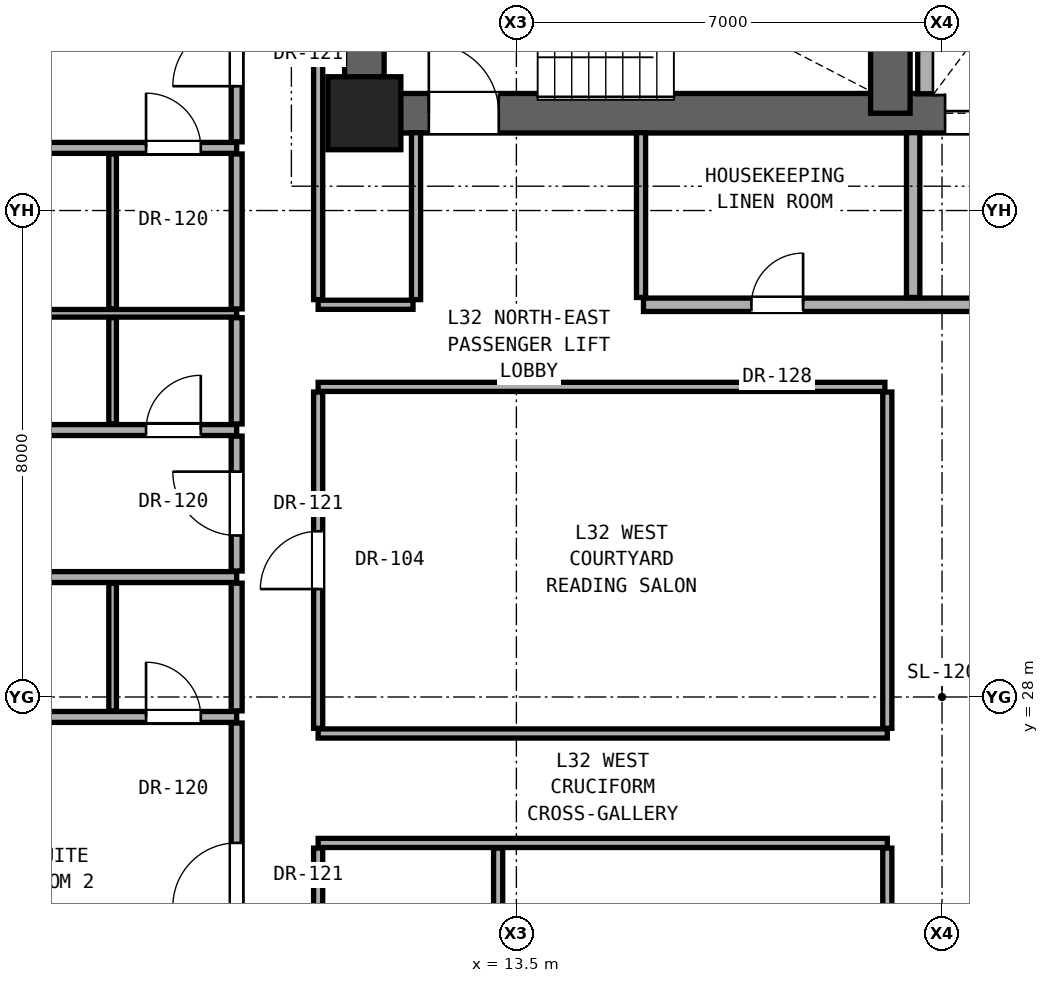
"""IFC4 building model, lengths in metres.
Left out: names, types, materials, properties, quantities, classifications, styles, units other than length and angle.
Written with IfcOpenShell. Run it as: python <this file> out.ifc"""

import sys

from ifc_helpers import new_model, si_unit, direction, frame, frame_2d, origin, origin_2d, place, context, subcontext, project, spatial, rectangle, extrude, element, fill, save


model = new_model("IFC4")
c1 = context("Model", 3, precision=1e-05, world=origin(), true_north=direction((0.0, 1.0)))
c2 = subcontext(c1, "Body", "Model", "MODEL_VIEW")
j1 = project(units=[si_unit("LENGTHUNIT", "METRE"), si_unit("PLANEANGLEUNIT", "RADIAN")], contexts=[c1])
p1 = place(None, origin())
s1 = spatial("IfcSite", under=j1, at=p1, CompositionType="ELEMENT")
p2 = place(p1, origin())
s2 = spatial("IfcBuilding", under=s1, at=p2, CompositionType="ELEMENT")
p3 = place(p2, frame((0.0, 0.0, 114.8)))
s3 = spatial("IfcBuildingStorey", under=s2, at=p3, CompositionType="ELEMENT", Elevation=114.8)
p4 = place(p3, frame((11.0, 37.6, 0.0), z_axis=(0.0, 0.0, 1.0), x_axis=(1.0, 0.0, 0.0)))
e1 = element("IfcColumn", 1, at=p4, inside=s3, PredefinedType="COLUMN", context=c2, shape_type="SweptSolid", body=[
    extrude(rectangle(XDim=1.2, YDim=1.2, at=origin_2d()), origin(), (0.0, 0.0, 1.0), 3.3),
])
p5 = place(p3, frame((11.0, 37.6, 0.0), z_axis=(0.0, 0.0, 1.0), x_axis=(0.0, 1.0, 0.0)))
e2 = element("IfcWall", 2, at=p5, inside=s3, PredefinedType="SHEAR", context=c2, shape_type="SweptSolid", body=[
    extrude(rectangle(XDim=6.0, YDim=0.65, at=frame_2d((3.0, 0.0))), origin(), (0.0, 0.0, 1.0), 3.08),
])
p6 = place(p3, frame((11.0, 37.6, 0.0), z_axis=(0.0, 0.0, 1.0), x_axis=(1.0, 0.0, 0.0)))
e3 = element("IfcWall", 3, at=p6, inside=s3, PredefinedType="SHEAR", context=c2, shape_type="SweptSolid", body=[
    extrude(rectangle(XDim=19.0, YDim=0.65, at=frame_2d((9.5, 0.0))), origin(), (0.0, 0.0, 1.0), 3.08),
])
p7 = place(p6, frame((1.06, 0.0, 0.0)))
e4 = element("IfcOpeningElement", 4, at=p7, cuts=e3, PredefinedType="OPENING", context=c2, shape_type="SweptSolid", body=[
    extrude(rectangle(XDim=1.15, YDim=2.2, at=frame_2d((0.575, 1.1))), frame((0.0, 0.335, 0.0), z_axis=(0.0, -1.0, 0.0), x_axis=(1.0, 0.0, 0.0)), (0.0, 0.0, 1.0), 0.67),
])
p8 = place(p6, frame((9.55, 0.0, 0.0)))
e5 = element("IfcOpeningElement", 5, at=p8, cuts=e3, PredefinedType="OPENING", context=c2, shape_type="SweptSolid", body=[
    extrude(rectangle(XDim=1.4, YDim=2.35, at=frame_2d((0.7, 1.175))), frame((0.0, 0.335, 0.0), z_axis=(0.0, -1.0, 0.0), x_axis=(1.0, 0.0, 0.0)), (0.0, 0.0, 1.0), 0.67),
])
p9 = place(p6, frame((11.95, 0.0, 0.0)))
e6 = element("IfcOpeningElement", 6, at=p9, cuts=e3, PredefinedType="OPENING", context=c2, shape_type="SweptSolid", body=[
    extrude(rectangle(XDim=1.4, YDim=2.35, at=frame_2d((0.7, 1.175))), frame((0.0, 0.335, 0.0), z_axis=(0.0, -1.0, 0.0), x_axis=(1.0, 0.0, 0.0)), (0.0, 0.0, 1.0), 0.67),
])
p10 = place(p3, frame((19.65, 37.6, 0.0), z_axis=(0.0, 0.0, 1.0), x_axis=(0.0, 1.0, 0.0)))
e7 = element("IfcWall", 7, at=p10, inside=s3, PredefinedType="SHEAR", context=c2, shape_type="SweptSolid", body=[
    extrude(rectangle(XDim=3.493, YDim=0.65, at=frame_2d((1.747, 0.0))), origin(), (0.0, 0.0, 1.0), 3.08),
])
for number, where, z_axis, x_axis in (
    (8, (10.24, 25.6, 0.0), (0.0, 0.0, 1.0), (1.0, 0.0, 0.0)),
    (9, (10.24, 27.4, 0.0), (0.0, 0.0, 1.0), (1.0, 0.0, 0.0)),
):
    element("IfcWall", number, at=place(p3, frame(where, z_axis=z_axis, x_axis=x_axis)), inside=s3, PredefinedType="PARTITIONING", context=c2, shape_type="SweptSolid", body=[
        extrude(rectangle(XDim=9.36, YDim=0.15, at=frame_2d((4.68, 0.0))), origin(), (0.0, 0.0, 1.0), 2.124),
    ])
p11 = place(p3, frame((-1.97, 27.672, 0.0), z_axis=(0.0, 0.0, 1.0), x_axis=(1.0, 0.0, 0.0)))
e10 = element("IfcWall", 10, at=p11, inside=s3, PredefinedType="PARTITIONING", context=c2, shape_type="SweptSolid", body=[
    extrude(rectangle(XDim=10.87, YDim=0.18, at=frame_2d((5.435, 0.0))), origin(), (0.0, 0.0, 1.0), 2.145),
])
p12 = place(p11, frame((4.01, 0.0, 0.0)))
e11 = element("IfcOpeningElement", 11, at=p12, cuts=e10, PredefinedType="OPENING", context=c2, shape_type="SweptSolid", body=[
    extrude(rectangle(XDim=0.85, YDim=2.01, at=frame_2d((0.425, 1.005))), frame((0.0, 0.1, 0.0), z_axis=(0.0, -1.0, 0.0), x_axis=(1.0, 0.0, 0.0)), (0.0, 0.0, 1.0), 0.2),
])
p13 = place(p11, frame((9.38, 0.0, 0.0)))
e12 = element("IfcOpeningElement", 12, at=p13, cuts=e10, PredefinedType="OPENING", context=c2, shape_type="SweptSolid", body=[
    extrude(rectangle(XDim=0.9, YDim=2.1, at=frame_2d((0.45, 1.05))), frame((0.0, 0.1, 0.0), z_axis=(0.0, -1.0, 0.0), x_axis=(1.0, 0.0, 0.0)), (0.0, 0.0, 1.0), 0.2),
])
p14 = place(p3, frame((-1.97, 29.972, 0.0), z_axis=(0.0, 0.0, 1.0), x_axis=(1.0, 0.0, 0.0)))
e13 = element("IfcWall", 13, at=p14, inside=s3, PredefinedType="PARTITIONING", context=c2, shape_type="SweptSolid", body=[
    extrude(rectangle(XDim=10.87, YDim=0.18, at=frame_2d((5.435, 0.0))), origin(), (0.0, 0.0, 1.0), 2.145),
])
p15 = place(p3, frame((-1.97, 32.39, 0.0), z_axis=(0.0, 0.0, 1.0), x_axis=(1.0, 0.0, 0.0)))
e14 = element("IfcWall", 14, at=p15, inside=s3, PredefinedType="PARTITIONING", context=c2, shape_type="SweptSolid", body=[
    extrude(rectangle(XDim=10.87, YDim=0.18, at=frame_2d((5.435, 0.0))), origin(), (0.0, 0.0, 1.0), 2.145),
])
p16 = place(p15, frame((4.96, 0.0, 0.0)))
e15 = element("IfcOpeningElement", 15, at=p16, cuts=e14, PredefinedType="OPENING", context=c2, shape_type="SweptSolid", body=[
    extrude(rectangle(XDim=0.85, YDim=2.01, at=frame_2d((0.425, 1.005))), frame((0.0, 0.1, 0.0), z_axis=(0.0, -1.0, 0.0), x_axis=(1.0, 0.0, 0.0)), (0.0, 0.0, 1.0), 0.2),
])
p17 = place(p15, frame((9.38, 0.0, 0.0)))
e16 = element("IfcOpeningElement", 16, at=p17, cuts=e14, PredefinedType="OPENING", context=c2, shape_type="SweptSolid", body=[
    extrude(rectangle(XDim=0.9, YDim=2.1, at=frame_2d((0.45, 1.05))), frame((0.0, 0.1, 0.0), z_axis=(0.0, -1.0, 0.0), x_axis=(1.0, 0.0, 0.0)), (0.0, 0.0, 1.0), 0.2),
])
p18 = place(p3, frame((10.24, 33.1, 0.0), z_axis=(0.0, 0.0, 1.0), x_axis=(1.0, 0.0, 0.0)))
e17 = element("IfcWall", 17, at=p18, inside=s3, PredefinedType="PARTITIONING", context=c2, shape_type="SweptSolid", body=[
    extrude(rectangle(XDim=9.32, YDim=0.15, at=frame_2d((4.66, 0.0))), origin(), (0.0, 0.0, 1.0), 2.124),
])
p19 = place(p3, frame((-1.97, 34.31, 0.0), z_axis=(0.0, 0.0, 1.0), x_axis=(1.0, 0.0, 0.0)))
e18 = element("IfcWall", 18, at=p19, inside=s3, PredefinedType="PARTITIONING", context=c2, shape_type="SweptSolid", body=[
    extrude(rectangle(XDim=10.87, YDim=0.125, at=frame_2d((5.435, 0.0))), origin(), (0.0, 0.0, 1.0), 2.145),
])
p20 = place(p3, frame((10.24, 34.45, 0.0), z_axis=(0.0, 0.0, 1.0), x_axis=(1.0, 0.0, 0.0)))
e19 = element("IfcWall", 19, at=p20, inside=s3, PredefinedType="PARTITIONING", context=c2, shape_type="SweptSolid", body=[
    extrude(rectangle(XDim=1.56, YDim=0.15, at=frame_2d((0.78, 0.0))), origin(), (0.0, 0.0, 1.0), 2.124),
])
p21 = place(p3, frame((15.59, 34.45, 0.0), z_axis=(0.0, 0.0, 1.0), x_axis=(1.0, 0.0, 0.0)))
e20 = element("IfcWall", 20, at=p21, inside=s3, PredefinedType="SOLIDWALL", context=c2, shape_type="SweptSolid", body=[
    extrude(rectangle(XDim=15.17, YDim=0.22, at=frame_2d((7.585, 0.0))), origin(), (0.0, 0.0, 1.0), 2.124),
])
p22 = place(p21, frame((6.435, 0.0, 0.0)))
e21 = element("IfcOpeningElement", 21, at=p22, cuts=e20, PredefinedType="OPENING", context=c2, shape_type="SweptSolid", body=[
    extrude(rectangle(XDim=0.85, YDim=2.01, at=frame_2d((0.425, 1.005))), frame((0.0, 0.12, 0.0), z_axis=(0.0, -1.0, 0.0), x_axis=(1.0, 0.0, 0.0)), (0.0, 0.0, 1.0), 0.24),
])
p23 = place(p21, frame((11.135, 0.0, 0.0)))
e22 = element("IfcOpeningElement", 22, at=p23, cuts=e20, PredefinedType="OPENING", context=c2, shape_type="SweptSolid", body=[
    extrude(rectangle(XDim=0.85, YDim=2.01, at=frame_2d((0.425, 1.005))), frame((0.0, 0.12, 0.0), z_axis=(0.0, -1.0, 0.0), x_axis=(1.0, 0.0, 0.0)), (0.0, 0.0, 1.0), 0.24),
])
p24 = place(p21, frame((1.775, 0.0, 0.0)))
e23 = element("IfcOpeningElement", 23, at=p24, cuts=e20, PredefinedType="OPENING", context=c2, shape_type="SweptSolid", body=[
    extrude(rectangle(XDim=0.85, YDim=2.01, at=frame_2d((0.425, 1.005))), frame((0.0, 0.12, 0.0), z_axis=(0.0, -1.0, 0.0), x_axis=(1.0, 0.0, 0.0)), (0.0, 0.0, 1.0), 0.24),
])
p25 = place(p3, frame((-1.97, 37.03, 0.0), z_axis=(0.0, 0.0, 1.0), x_axis=(1.0, 0.0, 0.0)))
e24 = element("IfcWall", 24, at=p25, inside=s3, PredefinedType="PARTITIONING", context=c2, shape_type="SweptSolid", body=[
    extrude(rectangle(XDim=10.87, YDim=0.18, at=frame_2d((5.435, 0.0))), origin(), (0.0, 0.0, 1.0), 2.145),
])
p26 = place(p25, frame((4.96, 0.0, 0.0)))
e25 = element("IfcOpeningElement", 25, at=p26, cuts=e24, PredefinedType="OPENING", context=c2, shape_type="SweptSolid", body=[
    extrude(rectangle(XDim=0.85, YDim=2.01, at=frame_2d((0.425, 1.005))), frame((0.0, 0.1, 0.0), z_axis=(0.0, -1.0, 0.0), x_axis=(1.0, 0.0, 0.0)), (0.0, 0.0, 1.0), 0.2),
])
p27 = place(p25, frame((9.38, 0.0, 0.0)))
e26 = element("IfcOpeningElement", 26, at=p27, cuts=e24, PredefinedType="OPENING", context=c2, shape_type="SweptSolid", body=[
    extrude(rectangle(XDim=0.9, YDim=2.1, at=frame_2d((0.45, 1.05))), frame((0.0, 0.1, 0.0), z_axis=(0.0, -1.0, 0.0), x_axis=(1.0, 0.0, 0.0)), (0.0, 0.0, 1.0), 0.2),
])
p28 = place(p3, frame((6.86, 27.772, 0.0), z_axis=(0.0, 0.0, 1.0), x_axis=(0.0, 1.0, 0.0)))
e27 = element("IfcWall", 27, at=p28, inside=s3, PredefinedType="PARTITIONING", context=c2, shape_type="SweptSolid", body=[
    extrude(rectangle(XDim=2.1, YDim=0.125, at=frame_2d((1.05, 0.0))), origin(), (0.0, 0.0, 1.0), 3.08),
])
p29 = place(p3, frame((6.86, 32.49, 0.0), z_axis=(0.0, 0.0, 1.0), x_axis=(0.0, 1.0, 0.0)))
e28 = element("IfcWall", 28, at=p29, inside=s3, PredefinedType="PARTITIONING", context=c2, shape_type="SweptSolid", body=[
    extrude(rectangle(XDim=1.748, YDim=0.125, at=frame_2d((0.874, 0.0))), origin(), (0.0, 0.0, 1.0), 3.08),
])
p30 = place(p3, frame((6.86, 34.383, 0.0), z_axis=(0.0, 0.0, 1.0), x_axis=(0.0, 1.0, 0.0)))
e29 = element("IfcWall", 29, at=p30, inside=s3, PredefinedType="PARTITIONING", context=c2, shape_type="SweptSolid", body=[
    extrude(rectangle(XDim=2.547, YDim=0.125, at=frame_2d((1.274, 0.0))), origin(), (0.0, 0.0, 1.0), 3.08),
])
p31 = place(p3, frame((8.9, 22.579, 0.0), z_axis=(0.0, 0.0, 1.0), x_axis=(0.0, 1.0, 0.0)))
e30 = element("IfcWall", 30, at=p31, inside=s3, PredefinedType="PARTITIONING", context=c2, shape_type="SweptSolid", body=[
    extrude(rectangle(XDim=4.993, YDim=0.18, at=frame_2d((2.497, 0.0))), origin(), (0.0, 0.0, 1.0), 2.299),
])
p32 = place(p31, frame((1.971, 0.0, 0.0)))
e31 = element("IfcOpeningElement", 31, at=p32, cuts=e30, PredefinedType="OPENING", context=c2, shape_type="SweptSolid", body=[
    extrude(rectangle(XDim=1.05, YDim=2.2, at=frame_2d((0.525, 1.1))), frame((0.0, 0.1, 0.0), z_axis=(0.0, -1.0, 0.0), x_axis=(1.0, 0.0, 0.0)), (0.0, 0.0, 1.0), 0.2),
])
p33 = place(p3, frame((8.9, 27.772, 0.0), z_axis=(0.0, 0.0, 1.0), x_axis=(0.0, 1.0, 0.0)))
e32 = element("IfcWall", 32, at=p33, inside=s3, PredefinedType="PARTITIONING", context=c2, shape_type="SweptSolid", body=[
    extrude(rectangle(XDim=2.1, YDim=0.18, at=frame_2d((1.05, 0.0))), origin(), (0.0, 0.0, 1.0), 3.08),
])
p34 = place(p3, frame((8.9, 30.072, 0.0), z_axis=(0.0, 0.0, 1.0), x_axis=(0.0, 1.0, 0.0)))
e33 = element("IfcWall", 33, at=p34, inside=s3, PredefinedType="PARTITIONING", context=c2, shape_type="SweptSolid", body=[
    extrude(rectangle(XDim=2.218, YDim=0.18, at=frame_2d((1.109, 0.0))), origin(), (0.0, 0.0, 1.0), 2.299),
])
p35 = place(p34, frame((0.584, 0.0, 0.0)))
e34 = element("IfcOpeningElement", 34, at=p35, cuts=e33, PredefinedType="OPENING", context=c2, shape_type="SweptSolid", body=[
    extrude(rectangle(XDim=1.05, YDim=2.2, at=frame_2d((0.525, 1.1))), frame((0.0, 0.1, 0.0), z_axis=(0.0, -1.0, 0.0), x_axis=(1.0, 0.0, 0.0)), (0.0, 0.0, 1.0), 0.2),
])
p36 = place(p3, frame((8.9, 32.49, 0.0), z_axis=(0.0, 0.0, 1.0), x_axis=(0.0, 1.0, 0.0)))
e35 = element("IfcWall", 35, at=p36, inside=s3, PredefinedType="PARTITIONING", context=c2, shape_type="SweptSolid", body=[
    extrude(rectangle(XDim=1.748, YDim=0.18, at=frame_2d((0.874, 0.0))), origin(), (0.0, 0.0, 1.0), 3.08),
])
p37 = place(p3, frame((8.9, 34.383, 0.0), z_axis=(0.0, 0.0, 1.0), x_axis=(0.0, 1.0, 0.0)))
e36 = element("IfcWall", 36, at=p37, inside=s3, PredefinedType="PARTITIONING", context=c2, shape_type="SweptSolid", body=[
    extrude(rectangle(XDim=2.547, YDim=0.18, at=frame_2d((1.274, 0.0))), origin(), (0.0, 0.0, 1.0), 3.08),
])
p38 = place(p3, frame((8.9, 37.13, 0.0), z_axis=(0.0, 0.0, 1.0), x_axis=(0.0, 1.0, 0.0)))
e37 = element("IfcWall", 37, at=p38, inside=s3, PredefinedType="PARTITIONING", context=c2, shape_type="SweptSolid", body=[
    extrude(rectangle(XDim=4.779, YDim=0.18, at=frame_2d((2.39, 0.0))), origin(), (0.0, 0.0, 1.0), 2.456),
])
p39 = place(p38, frame((0.915, 0.0, 0.0)))
e38 = element("IfcOpeningElement", 38, at=p39, cuts=e37, PredefinedType="OPENING", context=c2, shape_type="SweptSolid", body=[
    extrude(rectangle(XDim=1.05, YDim=2.2, at=frame_2d((0.525, 1.1))), frame((0.0, 0.1, 0.0), z_axis=(0.0, -1.0, 0.0), x_axis=(1.0, 0.0, 0.0)), (0.0, 0.0, 1.0), 0.2),
])
p40 = place(p3, frame((10.24, 22.935, 0.0), z_axis=(0.0, 0.0, 1.0), x_axis=(0.0, 1.0, 0.0)))
e39 = element("IfcWall", 39, at=p40, inside=s3, PredefinedType="PARTITIONING", context=c2, shape_type="SweptSolid", body=[
    extrude(rectangle(XDim=2.58, YDim=0.15, at=frame_2d((1.29, 0.0))), origin(), (0.0, 0.0, 1.0), 2.299),
])
p41 = place(p3, frame((10.24, 27.485, 0.0), z_axis=(0.0, 0.0, 1.0), x_axis=(0.0, 1.0, 0.0)))
e40 = element("IfcWall", 40, at=p41, inside=s3, PredefinedType="PARTITIONING", context=c2, shape_type="SweptSolid", body=[
    extrude(rectangle(XDim=5.53, YDim=0.15, at=frame_2d((2.765, 0.0))), origin(), (0.0, 0.0, 1.0), 2.299),
])
p42 = place(p41, frame((2.29, 0.0, 0.0)))
e41 = element("IfcOpeningElement", 41, at=p42, cuts=e40, PredefinedType="OPENING", context=c2, shape_type="SweptSolid", body=[
    extrude(rectangle(XDim=0.95, YDim=2.15, at=frame_2d((0.475, 1.075))), frame((0.0, 0.085, 0.0), z_axis=(0.0, -1.0, 0.0), x_axis=(1.0, 0.0, 0.0)), (0.0, 0.0, 1.0), 0.17),
])
p43 = place(p3, frame((10.24, 34.535, 0.0), z_axis=(0.0, 0.0, 1.0), x_axis=(0.0, 1.0, 0.0)))
e42 = element("IfcWall", 42, at=p43, inside=s3, PredefinedType="PARTITIONING", context=c2, shape_type="SweptSolid", body=[
    extrude(rectangle(XDim=9.13, YDim=0.15, at=frame_2d((4.565, 0.0))), origin(), (0.0, 0.0, 1.0), 2.456),
])
p44 = place(p3, frame((11.85, 34.535, 0.0), z_axis=(0.0, 0.0, 1.0), x_axis=(0.0, 1.0, 0.0)))
e43 = element("IfcWall", 43, at=p44, inside=s3, PredefinedType="PARTITIONING", context=c2, shape_type="SweptSolid", body=[
    extrude(rectangle(XDim=2.745, YDim=0.15, at=frame_2d((1.373, 0.0))), origin(), (0.0, 0.0, 1.0), 3.08),
])
p45 = place(p3, frame((13.2, 22.935, 0.0), z_axis=(0.0, 0.0, 1.0), x_axis=(0.0, 1.0, 0.0)))
e44 = element("IfcWall", 44, at=p45, inside=s3, PredefinedType="PARTITIONING", context=c2, shape_type="SweptSolid", body=[
    extrude(rectangle(XDim=2.58, YDim=0.15, at=frame_2d((1.29, 0.0))), origin(), (0.0, 0.0, 1.0), 2.124),
])
p46 = place(p3, frame((15.55, 34.57, 0.0), z_axis=(0.0, 0.0, 1.0), x_axis=(0.0, 1.0, 0.0)))
e45 = element("IfcWall", 45, at=p46, inside=s3, PredefinedType="PARTITIONING", context=c2, shape_type="SweptSolid", body=[
    extrude(rectangle(XDim=2.71, YDim=0.15, at=frame_2d((1.355, 0.0))), origin(), (0.0, 0.0, 1.0), 2.609),
])
for number, where, z_axis, x_axis in (
    (46, (19.6, 19.985, 0.0), (0.0, 0.0, 1.0), (0.0, 1.0, 0.0)),
    (47, (19.6, 27.485, 0.0), (0.0, 0.0, 1.0), (0.0, 1.0, 0.0)),
):
    element("IfcWall", number, at=place(p3, frame(where, z_axis=z_axis, x_axis=x_axis)), inside=s3, PredefinedType="PARTITIONING", context=c2, shape_type="SweptSolid", body=[
        extrude(rectangle(XDim=5.53, YDim=0.15, at=frame_2d((2.765, 0.0))), origin(), (0.0, 0.0, 1.0), 2.124),
    ])
p47 = place(p3, frame((20.025, 34.57, 0.0), z_axis=(0.0, 0.0, 1.0), x_axis=(0.0, 1.0, 0.0)))
e48 = element("IfcWall", 48, at=p47, inside=s3, PredefinedType="SOLIDWALL", context=c2, shape_type="SweptSolid", body=[
    extrude(rectangle(XDim=2.71, YDim=0.22, at=frame_2d((1.355, 0.0))), origin(), (0.0, 0.0, 1.0), 3.08),
])
p48 = place(p3, frame((20.25, 37.92, 0.0), z_axis=(0.0, 0.0, 1.0), x_axis=(0.0, 1.0, 0.0)))
e49 = element("IfcWall", 49, at=p48, inside=s3, PredefinedType="SOLIDWALL", context=c2, shape_type="SweptSolid", body=[
    extrude(rectangle(XDim=2.32, YDim=0.3, at=frame_2d((1.16, 0.0))), origin(), (0.0, 0.0, 1.0), 3.08),
])
p49 = place(p7, origin())
e50 = element("IfcDoor", 50, at=p49, inside=s3, OperationType="SINGLE_SWING_LEFT", PredefinedType="DOOR", context=c2, shape_type="SweptSolid", body=[
    extrude(rectangle(XDim=1.15, YDim=2.2, at=frame_2d((0.575, 1.1))), frame((0.0, 0.025, 0.0), z_axis=(0.0, -1.0, 0.0), x_axis=(1.0, 0.0, 0.0)), (0.0, 0.0, 1.0), 0.05),
])
fill(e4, e50)
p50 = place(p24, origin())
e51 = element("IfcDoor", 51, at=p50, inside=s3, OperationType="SINGLE_SWING_RIGHT", PredefinedType="DOOR", context=c2, shape_type="SweptSolid", body=[
    extrude(rectangle(XDim=0.85, YDim=2.01, at=frame_2d((0.425, 1.005))), frame((0.0, 0.025, 0.0), z_axis=(0.0, -1.0, 0.0), x_axis=(1.0, 0.0, 0.0)), (0.0, 0.0, 1.0), 0.05),
])
fill(e23, e51)
p51 = place(p32, origin())
e52 = element("IfcDoor", 52, at=p51, inside=s3, OperationType="SINGLE_SWING_LEFT", PredefinedType="DOOR", context=c2, shape_type="SweptSolid", body=[
    extrude(rectangle(XDim=1.05, YDim=2.2, at=frame_2d((0.525, 1.1))), frame((0.0, 0.025, 0.0), z_axis=(0.0, -1.0, 0.0), x_axis=(1.0, 0.0, 0.0)), (0.0, 0.0, 1.0), 0.05),
])
fill(e31, e52)
p52 = place(p13, origin())
e53 = element("IfcDoor", 53, at=p52, inside=s3, OperationType="SINGLE_SWING_LEFT", PredefinedType="DOOR", context=c2, shape_type="SweptSolid", body=[
    extrude(rectangle(XDim=0.9, YDim=2.1, at=frame_2d((0.45, 1.05))), frame((0.0, 0.025, 0.0), z_axis=(0.0, -1.0, 0.0), x_axis=(1.0, 0.0, 0.0)), (0.0, 0.0, 1.0), 0.05),
])
fill(e12, e53)
p53 = place(p35, origin())
e54 = element("IfcDoor", 54, at=p53, inside=s3, OperationType="SINGLE_SWING_RIGHT", PredefinedType="DOOR", context=c2, shape_type="SweptSolid", body=[
    extrude(rectangle(XDim=1.05, YDim=2.2, at=frame_2d((0.525, 1.1))), frame((0.0, 0.025, 0.0), z_axis=(0.0, -1.0, 0.0), x_axis=(1.0, 0.0, 0.0)), (0.0, 0.0, 1.0), 0.05),
])
fill(e34, e54)
p54 = place(p17, origin())
e55 = element("IfcDoor", 55, at=p54, inside=s3, OperationType="SINGLE_SWING_RIGHT", PredefinedType="DOOR", context=c2, shape_type="SweptSolid", body=[
    extrude(rectangle(XDim=0.9, YDim=2.1, at=frame_2d((0.45, 1.05))), frame((0.0, 0.025, 0.0), z_axis=(0.0, -1.0, 0.0), x_axis=(1.0, 0.0, 0.0)), (0.0, 0.0, 1.0), 0.05),
])
fill(e16, e55)
p55 = place(p39, origin())
e56 = element("IfcDoor", 56, at=p55, inside=s3, OperationType="SINGLE_SWING_LEFT", PredefinedType="DOOR", context=c2, shape_type="SweptSolid", body=[
    extrude(rectangle(XDim=1.05, YDim=2.2, at=frame_2d((0.525, 1.1))), frame((0.0, 0.025, 0.0), z_axis=(0.0, -1.0, 0.0), x_axis=(1.0, 0.0, 0.0)), (0.0, 0.0, 1.0), 0.05),
])
fill(e38, e56)
p56 = place(p27, origin())
e57 = element("IfcDoor", 57, at=p56, inside=s3, OperationType="SINGLE_SWING_LEFT", PredefinedType="DOOR", context=c2, shape_type="SweptSolid", body=[
    extrude(rectangle(XDim=0.9, YDim=2.1, at=frame_2d((0.45, 1.05))), frame((0.0, 0.025, 0.0), z_axis=(0.0, -1.0, 0.0), x_axis=(1.0, 0.0, 0.0)), (0.0, 0.0, 1.0), 0.05),
])
fill(e26, e57)
p57 = place(p42, origin())
e58 = element("IfcDoor", 58, at=p57, inside=s3, OperationType="SINGLE_SWING_LEFT", PredefinedType="DOOR", context=c2, shape_type="SweptSolid", body=[
    extrude(rectangle(XDim=0.95, YDim=2.15, at=frame_2d((0.475, 1.075))), frame((0.0, 0.025, 0.0), z_axis=(0.0, -1.0, 0.0), x_axis=(1.0, 0.0, 0.0)), (0.0, 0.0, 1.0), 0.05),
])
fill(e41, e58)
p58 = place(p8, origin())
e59 = element("IfcDoor", 59, at=p58, inside=s3, OperationType="DOUBLE_DOOR_SLIDING", PredefinedType="DOOR", context=c2, shape_type="SweptSolid", body=[
    extrude(rectangle(XDim=1.4, YDim=2.35, at=frame_2d((0.7, 1.175))), frame((0.0, 0.025, 0.0), z_axis=(0.0, -1.0, 0.0), x_axis=(1.0, 0.0, 0.0)), (0.0, 0.0, 1.0), 0.05),
])
fill(e5, e59)
save(model, sys.argv[1])
